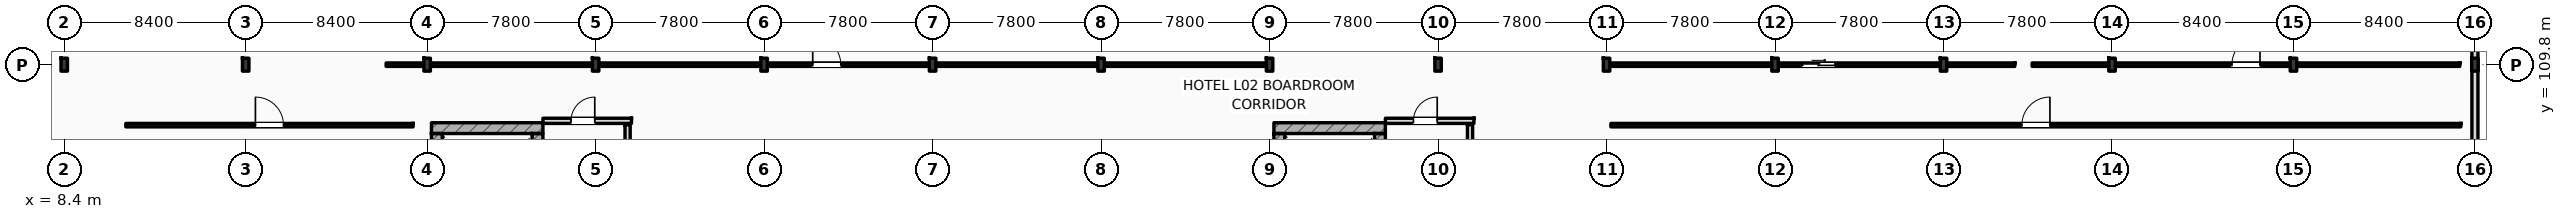
"""IFC4 building model, lengths in metres.
Left out: names, types, materials, properties, quantities, classifications, styles, units other than length and angle.
Written with IfcOpenShell. Run it as: python <this file> out.ifc"""

import sys

from ifc_helpers import new_model, si_unit, direction, frame, frame_2d, origin, origin_2d, place, context, subcontext, project, spatial, rectangle, i_section, extrude, element, fill, save


model = new_model("IFC4")
c1 = context("Model", 3, precision=1e-05, world=origin(), true_north=direction((0.0, 1.0)))
c2 = subcontext(c1, "Body", "Model", "MODEL_VIEW")
j1 = project(units=[si_unit("LENGTHUNIT", "METRE"), si_unit("PLANEANGLEUNIT", "RADIAN")], contexts=[c1])
p1 = place(None, origin())
s1 = spatial("IfcSite", under=j1, at=p1, CompositionType="ELEMENT")
p2 = place(p1, origin())
s2 = spatial("IfcBuilding", under=s1, at=p2, CompositionType="ELEMENT")
p3 = place(p2, frame((0.0, 0.0, 11.4)))
s3 = spatial("IfcBuildingStorey", under=s2, at=p3, CompositionType="ELEMENT", Elevation=11.4)
for number, where, z_axis, x_axis in (
    (1, (8.4, 109.8, 0.0), (0.0, 0.0, 1.0), (1.0, 0.0, 0.0)),
    (2, (16.8, 109.8, 0.0), (0.0, 0.0, 1.0), (1.0, 0.0, 0.0)),
    (3, (25.2, 109.8, 0.0), (0.0, 0.0, 1.0), (1.0, 0.0, 0.0)),
    (4, (33.0, 109.8, 0.0), (0.0, 0.0, 1.0), (1.0, 0.0, 0.0)),
    (5, (40.8, 109.8, 0.0), (0.0, 0.0, 1.0), (1.0, 0.0, 0.0)),
    (6, (48.6, 109.8, 0.0), (0.0, 0.0, 1.0), (1.0, 0.0, 0.0)),
    (7, (56.4, 109.8, 0.0), (0.0, 0.0, 1.0), (1.0, 0.0, 0.0)),
    (8, (64.2, 109.8, 0.0), (0.0, 0.0, 1.0), (1.0, 0.0, 0.0)),
    (9, (72.0, 109.8, 0.0), (0.0, 0.0, 1.0), (1.0, 0.0, 0.0)),
    (10, (79.8, 109.8, 0.0), (0.0, 0.0, 1.0), (1.0, 0.0, 0.0)),
    (11, (87.6, 109.8, 0.0), (0.0, 0.0, 1.0), (1.0, 0.0, 0.0)),
    (12, (95.4, 109.8, 0.0), (0.0, 0.0, 1.0), (1.0, 0.0, 0.0)),
    (13, (103.2, 109.8, 0.0), (0.0, 0.0, 1.0), (1.0, 0.0, 0.0)),
    (14, (111.6, 109.8, 0.0), (0.0, 0.0, 1.0), (1.0, 0.0, 0.0)),
    (15, (120.0, 109.8, 0.0), (0.0, 0.0, 1.0), (1.0, 0.0, 0.0)),
):
    element("IfcColumn", number, at=place(p3, frame(where, z_axis=z_axis, x_axis=x_axis)), inside=s3, PredefinedType="COLUMN", context=c2, shape_type="SweptSolid", body=[
        extrude(i_section(OverallWidth=0.3, OverallDepth=0.6, WebThickness=0.015, FlangeThickness=0.03, FilletRadius=0.027, at=origin_2d()), origin(), (0.0, 0.0, 1.0), 4.8),
    ])
p4 = place(p3, frame((25.4, 106.862, 0.0), z_axis=(0.0, 0.0, 1.0), x_axis=(1.0, 0.0, 0.0)))
e16 = element("IfcWall", 16, at=p4, inside=s3, PredefinedType="SHEAR", context=c2, shape_type="SweptSolid", body=[
    extrude(rectangle(XDim=5.16, YDim=0.5, at=frame_2d((2.58, 0.0))), origin(), (0.0, 0.0, 1.0), 4.8),
])
p5 = place(p3, frame((25.65, 97.5, 0.0), z_axis=(0.0, 0.0, 1.0), x_axis=(0.0, 1.0, 0.0)))
e17 = element("IfcWall", 17, at=p5, inside=s3, PredefinedType="SHEAR", context=c2, shape_type="SweptSolid", body=[
    extrude(rectangle(XDim=9.112, YDim=0.5, at=frame_2d((4.556, 0.0))), origin(), (0.0, 0.0, 1.0), 4.8),
])
p6 = place(p3, frame((30.31, 97.5, 0.0), z_axis=(0.0, 0.0, 1.0), x_axis=(0.0, 1.0, 0.0)))
e18 = element("IfcWall", 18, at=p6, inside=s3, PredefinedType="SHEAR", context=c2, shape_type="SweptSolid", body=[
    extrude(rectangle(XDim=9.112, YDim=0.5, at=frame_2d((4.556, 0.0))), origin(), (0.0, 0.0, 1.0), 4.8),
])
p7 = place(p6, frame((0.44, 0.0, 0.0)))
e19 = element("IfcOpeningElement", 19, at=p7, cuts=e18, PredefinedType="OPENING", context=c2, shape_type="SweptSolid", body=[
    extrude(rectangle(XDim=1.1, YDim=2.2, at=frame_2d((0.55, 1.1))), frame((0.0, 0.26, 0.0), z_axis=(0.0, -1.0, 0.0), x_axis=(1.0, 0.0, 0.0)), (0.0, 0.0, 1.0), 0.52),
])
p8 = place(p3, frame((64.4, 106.862, 0.0), z_axis=(0.0, 0.0, 1.0), x_axis=(1.0, 0.0, 0.0)))
e20 = element("IfcWall", 20, at=p8, inside=s3, PredefinedType="SHEAR", context=c2, shape_type="SweptSolid", body=[
    extrude(rectangle(XDim=5.16, YDim=0.5, at=frame_2d((2.58, 0.0))), origin(), (0.0, 0.0, 1.0), 4.8),
])
p9 = place(p3, frame((64.65, 97.5, 0.0), z_axis=(0.0, 0.0, 1.0), x_axis=(0.0, 1.0, 0.0)))
e21 = element("IfcWall", 21, at=p9, inside=s3, PredefinedType="SHEAR", context=c2, shape_type="SweptSolid", body=[
    extrude(rectangle(XDim=9.112, YDim=0.5, at=frame_2d((4.556, 0.0))), origin(), (0.0, 0.0, 1.0), 4.8),
])
p10 = place(p3, frame((69.31, 97.5, 0.0), z_axis=(0.0, 0.0, 1.0), x_axis=(0.0, 1.0, 0.0)))
e22 = element("IfcWall", 22, at=p10, inside=s3, PredefinedType="SHEAR", context=c2, shape_type="SweptSolid", body=[
    extrude(rectangle(XDim=9.112, YDim=0.5, at=frame_2d((4.556, 0.0))), origin(), (0.0, 0.0, 1.0), 4.8),
])
p11 = place(p10, frame((0.44, 0.0, 0.0)))
e23 = element("IfcOpeningElement", 23, at=p11, cuts=e22, PredefinedType="OPENING", context=c2, shape_type="SweptSolid", body=[
    extrude(rectangle(XDim=1.1, YDim=2.2, at=frame_2d((0.55, 1.1))), frame((0.0, 0.26, 0.0), z_axis=(0.0, -1.0, 0.0), x_axis=(1.0, 0.0, 0.0)), (0.0, 0.0, 1.0), 0.52),
])
p12 = place(p3, frame((120.0, 96.0, 0.0), z_axis=(0.0, 0.0, 1.0), x_axis=(0.0, 1.0, 0.0)))
e24 = element("IfcWall", 24, at=p12, inside=s3, PredefinedType="STANDARD", context=c2, shape_type="SweptSolid", body=[
    extrude(rectangle(XDim=22.0, YDim=0.28, at=frame_2d((11.0, 0.0))), origin(), (0.0, 0.0, 1.0), 4.11),
])
p13 = place(p3, frame((34.48, 98.78, 0.0), z_axis=(0.0, 0.0, 1.0), x_axis=(0.0, 1.0, 0.0)))
e25 = element("IfcWall", 25, at=p13, inside=s3, PredefinedType="STANDARD", context=c2, shape_type="SweptSolid", body=[
    extrude(rectangle(XDim=8.24, YDim=0.24, at=frame_2d((4.12, 0.0))), origin(), (0.0, 0.0, 1.0), 4.52),
])
p14 = place(p3, frame((30.56, 107.2, 0.0), z_axis=(0.0, 0.0, 1.0), x_axis=(1.0, 0.0, 0.0)))
e26 = element("IfcWall", 26, at=p14, inside=s3, PredefinedType="STANDARD", context=c2, shape_type="SweptSolid", body=[
    extrude(rectangle(XDim=4.1, YDim=0.24, at=frame_2d((2.05, 0.0))), origin(), (0.0, 0.0, 1.0), 4.52),
])
p15 = place(p14, frame((1.3, 0.0, 0.0)))
e27 = element("IfcOpeningElement", 27, at=p15, cuts=e26, PredefinedType="OPENING", context=c2, shape_type="SweptSolid", body=[
    extrude(rectangle(XDim=1.1, YDim=2.2, at=frame_2d((0.55, 1.1))), frame((0.0, 0.13, 0.0), z_axis=(0.0, -1.0, 0.0), x_axis=(1.0, 0.0, 0.0)), (0.0, 0.0, 1.0), 0.26),
])
p16 = place(p3, frame((73.48, 98.78, 0.0), z_axis=(0.0, 0.0, 1.0), x_axis=(0.0, 1.0, 0.0)))
e28 = element("IfcWall", 28, at=p16, inside=s3, PredefinedType="STANDARD", context=c2, shape_type="SweptSolid", body=[
    extrude(rectangle(XDim=8.24, YDim=0.24, at=frame_2d((4.12, 0.0))), origin(), (0.0, 0.0, 1.0), 4.52),
])
p17 = place(p3, frame((69.56, 107.2, 0.0), z_axis=(0.0, 0.0, 1.0), x_axis=(1.0, 0.0, 0.0)))
e29 = element("IfcWall", 29, at=p17, inside=s3, PredefinedType="STANDARD", context=c2, shape_type="SweptSolid", body=[
    extrude(rectangle(XDim=4.1, YDim=0.24, at=frame_2d((2.05, 0.0))), origin(), (0.0, 0.0, 1.0), 4.52),
])
p18 = place(p17, frame((1.3, 0.0, 0.0)))
e30 = element("IfcOpeningElement", 30, at=p18, cuts=e29, PredefinedType="OPENING", context=c2, shape_type="SweptSolid", body=[
    extrude(rectangle(XDim=1.1, YDim=2.2, at=frame_2d((0.55, 1.1))), frame((0.0, 0.13, 0.0), z_axis=(0.0, -1.0, 0.0), x_axis=(1.0, 0.0, 0.0)), (0.0, 0.0, 1.0), 0.26),
])
p19 = place(p3, frame((80.05, 109.8, 0.0), z_axis=(0.0, 0.0, 1.0), x_axis=(1.0, 0.0, 0.0)))
e31 = element("IfcWall", 31, at=p19, inside=s3, PredefinedType="PARTITIONING", context=c2, shape_type="SweptSolid", body=[
    extrude(rectangle(XDim=18.65, YDim=0.16, at=frame_2d((9.325, 0.0))), origin(), (0.0, 0.0, 1.0), 4.06),
])
p20 = place(p19, frame((8.825, 0.0, 0.0)))
e32 = element("IfcOpeningElement", 32, at=p20, cuts=e31, PredefinedType="OPENING", context=c2, shape_type="SweptSolid", body=[
    extrude(rectangle(XDim=1.5, YDim=2.25, at=frame_2d((0.75, 1.125))), frame((0.0, 0.09, 0.0), z_axis=(0.0, -1.0, 0.0), x_axis=(1.0, 0.0, 0.0)), (0.0, 0.0, 1.0), 0.18),
])
p21 = place(p3, frame((99.5, 109.8, 0.0), z_axis=(0.0, 0.0, 1.0), x_axis=(1.0, 0.0, 0.0)))
e33 = element("IfcWall", 33, at=p21, inside=s3, PredefinedType="PARTITIONING", context=c2, shape_type="SweptSolid", body=[
    extrude(rectangle(XDim=19.8, YDim=0.16, at=frame_2d((9.9, 0.0))), origin(), (0.0, 0.0, 1.0), 3.96),
])
p22 = place(p21, frame((9.25, 0.0, 0.0)))
e34 = element("IfcOpeningElement", 34, at=p22, cuts=e33, PredefinedType="OPENING", context=c2, shape_type="SweptSolid", body=[
    extrude(rectangle(XDim=1.3, YDim=2.2, at=frame_2d((0.65, 1.1))), frame((0.0, 0.09, 0.0), z_axis=(0.0, -1.0, 0.0), x_axis=(1.0, 0.0, 0.0)), (0.0, 0.0, 1.0), 0.18),
])
p23 = place(p3, frame((23.3, 109.8, 0.0), z_axis=(0.0, 0.0, 1.0), x_axis=(1.0, 0.0, 0.0)))
e35 = element("IfcWall", 35, at=p23, inside=s3, PredefinedType="PARTITIONING", context=c2, shape_type="SweptSolid", body=[
    extrude(rectangle(XDim=40.8, YDim=0.16, at=frame_2d((20.4, 0.0))), origin(), (0.0, 0.0, 1.0), 3.96),
])
p24 = place(p23, frame((19.75, 0.0, 0.0)))
e36 = element("IfcOpeningElement", 36, at=p24, cuts=e35, PredefinedType="OPENING", context=c2, shape_type="SweptSolid", body=[
    extrude(rectangle(XDim=1.3, YDim=2.2, at=frame_2d((0.65, 1.1))), frame((0.0, 0.09, 0.0), z_axis=(0.0, -1.0, 0.0), x_axis=(1.0, 0.0, 0.0)), (0.0, 0.0, 1.0), 0.18),
])
p25 = place(p3, frame((80.0, 107.0, 0.0), z_axis=(0.0, 0.0, 1.0), x_axis=(1.0, 0.0, 0.0)))
e37 = element("IfcWall", 37, at=p25, inside=s3, PredefinedType="PARTITIONING", context=c2, shape_type="SweptSolid", body=[
    extrude(rectangle(XDim=39.35, YDim=0.16, at=frame_2d((19.675, 0.0))), origin(), (0.0, 0.0, 1.0), 4.52),
])
p26 = place(p25, frame((19.025, 0.0, 0.0)))
e38 = element("IfcOpeningElement", 38, at=p26, cuts=e37, PredefinedType="OPENING", context=c2, shape_type="SweptSolid", body=[
    extrude(rectangle(XDim=1.3, YDim=2.2, at=frame_2d((0.65, 1.1))), frame((0.0, 0.09, 0.0), z_axis=(0.0, -1.0, 0.0), x_axis=(1.0, 0.0, 0.0)), (0.0, 0.0, 1.0), 0.18),
])
p27 = place(p3, frame((11.25, 107.0, 0.0), z_axis=(0.0, 0.0, 1.0), x_axis=(1.0, 0.0, 0.0)))
e39 = element("IfcWall", 39, at=p27, inside=s3, PredefinedType="PARTITIONING", context=c2, shape_type="SweptSolid", body=[
    extrude(rectangle(XDim=13.3, YDim=0.16, at=frame_2d((6.65, 0.0))), origin(), (0.0, 0.0, 1.0), 4.52),
])
p28 = place(p27, frame((6.0, 0.0, 0.0)))
e40 = element("IfcOpeningElement", 40, at=p28, cuts=e39, PredefinedType="OPENING", context=c2, shape_type="SweptSolid", body=[
    extrude(rectangle(XDim=1.3, YDim=2.2, at=frame_2d((0.65, 1.1))), frame((0.0, 0.09, 0.0), z_axis=(0.0, -1.0, 0.0), x_axis=(1.0, 0.0, 0.0)), (0.0, 0.0, 1.0), 0.18),
])
p29 = place(p15, origin())
e41 = element("IfcDoor", 41, at=p29, inside=s3, OperationType="SINGLE_SWING_RIGHT", PredefinedType="DOOR", context=c2, shape_type="SweptSolid", body=[
    extrude(rectangle(XDim=1.1, YDim=2.2, at=frame_2d((0.55, 1.1))), frame((0.0, 0.025, 0.0), z_axis=(0.0, -1.0, 0.0), x_axis=(1.0, 0.0, 0.0)), (0.0, 0.0, 1.0), 0.05),
])
fill(e27, e41)
p30 = place(p18, origin())
e42 = element("IfcDoor", 42, at=p30, inside=s3, OperationType="SINGLE_SWING_RIGHT", PredefinedType="DOOR", context=c2, shape_type="SweptSolid", body=[
    extrude(rectangle(XDim=1.1, YDim=2.2, at=frame_2d((0.55, 1.1))), frame((0.0, 0.025, 0.0), z_axis=(0.0, -1.0, 0.0), x_axis=(1.0, 0.0, 0.0)), (0.0, 0.0, 1.0), 0.05),
])
fill(e30, e42)
p31 = place(p20, origin())
e43 = element("IfcDoor", 43, at=p31, inside=s3, OperationType="SLIDING_TO_RIGHT", PredefinedType="DOOR", context=c2, shape_type="SweptSolid", body=[
    extrude(rectangle(XDim=1.5, YDim=2.25, at=frame_2d((0.75, 1.125))), frame((0.0, 0.025, 0.0), z_axis=(0.0, -1.0, 0.0), x_axis=(1.0, 0.0, 0.0)), (0.0, 0.0, 1.0), 0.05),
])
fill(e32, e43)
p32 = place(p22, origin())
e44 = element("IfcDoor", 44, at=p32, inside=s3, OperationType="SINGLE_SWING_RIGHT", PredefinedType="DOOR", context=c2, shape_type="SweptSolid", body=[
    extrude(rectangle(XDim=1.3, YDim=2.2, at=frame_2d((0.65, 1.1))), frame((0.0, 0.025, 0.0), z_axis=(0.0, -1.0, 0.0), x_axis=(1.0, 0.0, 0.0)), (0.0, 0.0, 1.0), 0.05),
])
fill(e34, e44)
p33 = place(p24, origin())
e45 = element("IfcDoor", 45, at=p33, inside=s3, OperationType="SINGLE_SWING_LEFT", PredefinedType="DOOR", context=c2, shape_type="SweptSolid", body=[
    extrude(rectangle(XDim=1.3, YDim=2.2, at=frame_2d((0.65, 1.1))), frame((0.0, 0.025, 0.0), z_axis=(0.0, -1.0, 0.0), x_axis=(1.0, 0.0, 0.0)), (0.0, 0.0, 1.0), 0.05),
])
fill(e36, e45)
p34 = place(p26, origin())
e46 = element("IfcDoor", 46, at=p34, inside=s3, OperationType="SINGLE_SWING_RIGHT", PredefinedType="DOOR", context=c2, shape_type="SweptSolid", body=[
    extrude(rectangle(XDim=1.3, YDim=2.2, at=frame_2d((0.65, 1.1))), frame((0.0, 0.025, 0.0), z_axis=(0.0, -1.0, 0.0), x_axis=(1.0, 0.0, 0.0)), (0.0, 0.0, 1.0), 0.05),
])
fill(e38, e46)
p35 = place(p28, origin())
e47 = element("IfcDoor", 47, at=p35, inside=s3, OperationType="SINGLE_SWING_LEFT", PredefinedType="DOOR", context=c2, shape_type="SweptSolid", body=[
    extrude(rectangle(XDim=1.3, YDim=2.2, at=frame_2d((0.65, 1.1))), frame((0.0, 0.025, 0.0), z_axis=(0.0, -1.0, 0.0), x_axis=(1.0, 0.0, 0.0)), (0.0, 0.0, 1.0), 0.05),
])
fill(e40, e47)
save(model, sys.argv[1])
